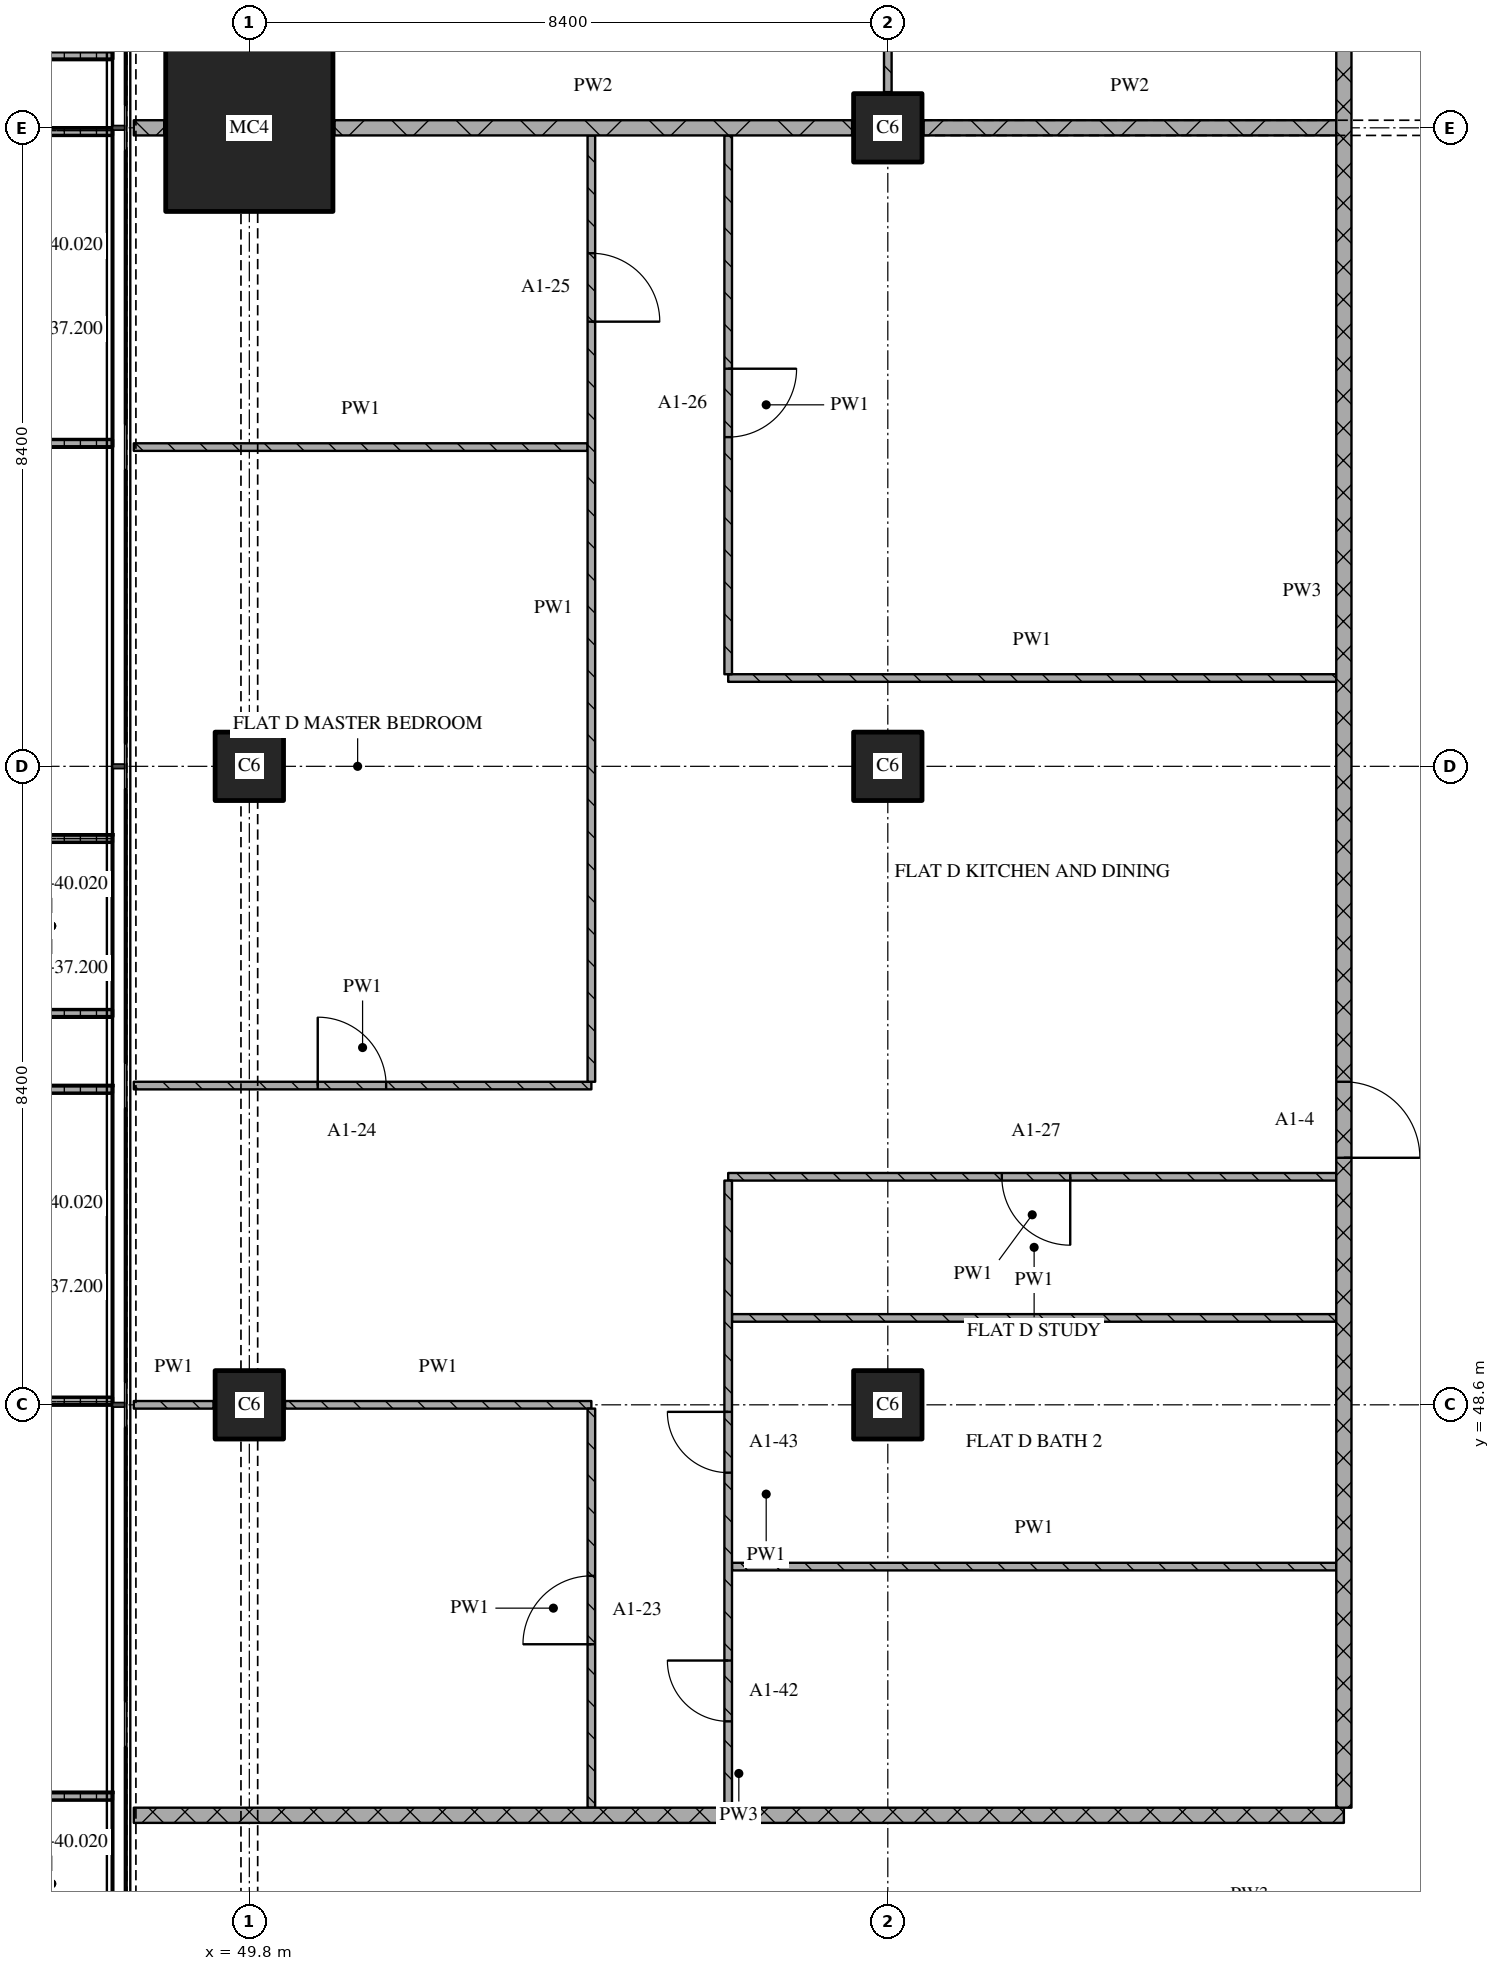
"""IFC4 building model, lengths in metres.
Left out: names, types, materials, properties, quantities, classifications, styles, units other than length and angle.
Written with IfcOpenShell. Run it as: python <this file> out.ifc"""

import sys

from ifc_helpers import new_model, si_unit, direction, frame, frame_2d, origin, origin_2d, place, context, subcontext, project, spatial, polyline, rectangle, outline, extrude, element, fill, save


model = new_model("IFC4")
c1 = context("Model", 3, precision=1e-05, world=origin(), true_north=direction((0.0, 1.0)))
c2 = subcontext(c1, "Body", "Model", "MODEL_VIEW")
j1 = project(units=[si_unit("LENGTHUNIT", "METRE"), si_unit("PLANEANGLEUNIT", "RADIAN")], contexts=[c1])
p1 = place(None, origin())
s1 = spatial("IfcSite", under=j1, at=p1, CompositionType="ELEMENT")
p2 = place(p1, origin())
s2 = spatial("IfcBuilding", under=s1, at=p2, CompositionType="ELEMENT")
p3 = place(p2, frame((0.0, 0.0, 37.2)))
s3 = spatial("IfcBuildingStorey", under=s2, at=p3, CompositionType="ELEMENT", Elevation=37.2)
for number, where, z_axis, x_axis in (
    (1, (49.8, 48.6, 0.0), (0.0, 0.0, 1.0), (1.0, 0.0, 0.0)),
    (2, (49.8, 57.0, 0.0), (0.0, 0.0, 1.0), (1.0, 0.0, 0.0)),
):
    element("IfcColumn", number, at=place(p3, frame(where, z_axis=z_axis, x_axis=x_axis)), inside=s3, PredefinedType="COLUMN", context=c2, shape_type="SweptSolid", body=[
        extrude(rectangle(XDim=0.9, YDim=0.9, at=origin_2d()), origin(), (0.0, 0.0, 1.0), 3.6),
    ])
p4 = place(p3, frame((49.8, 65.4, 0.0), z_axis=(0.0, 0.0, 1.0), x_axis=(1.0, 0.0, 0.0)))
e3 = element("IfcColumn", 3, at=p4, inside=s3, PredefinedType="COLUMN", context=c2, shape_type="SweptSolid", body=[
    extrude(rectangle(XDim=2.2, YDim=2.2, at=origin_2d()), origin(), (0.0, 0.0, 1.0), 3.6),
])
for number, where, z_axis, x_axis in (
    (4, (58.2, 48.6, 0.0), (0.0, 0.0, 1.0), (1.0, 0.0, 0.0)),
    (5, (58.2, 57.0, 0.0), (0.0, 0.0, 1.0), (1.0, 0.0, 0.0)),
    (6, (58.2, 65.4, 0.0), (0.0, 0.0, 1.0), (1.0, 0.0, 0.0)),
):
    element("IfcColumn", number, at=place(p3, frame(where, z_axis=z_axis, x_axis=x_axis)), inside=s3, PredefinedType="COLUMN", context=c2, shape_type="SweptSolid", body=[
        extrude(rectangle(XDim=0.9, YDim=0.9, at=origin_2d()), origin(), (0.0, 0.0, 1.0), 3.6),
    ])
p5 = place(p3, origin())
e7 = element("IfcWall", 7, at=p5, inside=s3, PredefinedType="SOLIDWALL", context=c2, shape_type="SweptSolid", body=[
    extrude(outline(polyline([(48.0, 68.7), (48.0, 68.6), (46.5, 68.6), (46.5, 66.4), (48.0, 66.4), (48.0, 66.3), (46.4, 66.3), (46.4, 68.7), (48.0, 68.7)])), origin(), (0.0, 0.0, 1.0), 1.0),
])
p6 = place(p3, origin())
e8 = element("IfcWall", 8, at=p6, inside=s3, PredefinedType="SOLIDWALL", context=c2, shape_type="SweptSolid", body=[
    extrude(outline(polyline([(48.0, 65.4), (48.0, 65.3), (46.367, 65.3), (46.367, 61.3), (48.0, 61.3), (48.0, 61.2), (46.267, 61.2), (46.267, 65.4), (48.0, 65.4)])), origin(), (0.0, 0.0, 1.0), 1.0),
])
p7 = place(p3, origin())
e9 = element("IfcWall", 9, at=p7, inside=s3, PredefinedType="SOLIDWALL", context=c2, shape_type="SweptSolid", body=[
    extrude(outline(polyline([(48.0, 56.1), (48.0, 56.0), (46.5, 56.0), (46.5, 53.8), (48.0, 53.8), (48.0, 53.7), (46.4, 53.7), (46.4, 56.1), (48.0, 56.1)])), origin(), (0.0, 0.0, 1.0), 1.0),
])
p8 = place(p3, origin())
e10 = element("IfcWall", 10, at=p8, inside=s3, PredefinedType="SOLIDWALL", context=c2, shape_type="SweptSolid", body=[
    extrude(outline(polyline([(48.0, 52.8), (48.0, 52.7), (46.367, 52.7), (46.367, 48.7), (48.0, 48.7), (48.0, 48.6), (46.267, 48.6), (46.267, 52.8), (48.0, 52.8)])), origin(), (0.0, 0.0, 1.0), 1.0),
])
p9 = place(p3, origin())
e11 = element("IfcWall", 11, at=p9, inside=s3, PredefinedType="SOLIDWALL", context=c2, shape_type="SweptSolid", body=[
    extrude(outline(polyline([(48.0, 43.5), (48.0, 43.4), (46.5, 43.4), (46.5, 41.2), (48.0, 41.2), (48.0, 41.1), (46.4, 41.1), (46.4, 43.5), (48.0, 43.5)])), origin(), (0.0, 0.0, 1.0), 1.0),
])
p10 = place(p3, frame((48.28, 43.2, 0.0), z_axis=(0.0, 0.0, 1.0), x_axis=(1.0, 0.0, 0.0)))
e12 = element("IfcWall", 12, at=p10, inside=s3, PredefinedType="PARTITIONING", context=c2, shape_type="SweptSolid", body=[
    extrude(rectangle(XDim=15.92, YDim=0.2, at=frame_2d((7.96, 0.0))), origin(), (0.0, 0.0, 1.0), 3.32),
])
p11 = place(p3, frame((56.15, 46.472, 0.0), z_axis=(0.0, 0.0, 1.0), x_axis=(1.0, 0.0, 0.0)))
e13 = element("IfcWall", 13, at=p11, inside=s3, PredefinedType="PARTITIONING", context=c2, shape_type="SweptSolid", body=[
    extrude(rectangle(XDim=7.95, YDim=0.1, at=frame_2d((3.975, 0.0))), origin(), (0.0, 0.0, 1.0), 3.32),
])
p12 = place(p3, frame((48.28, 48.6, 0.0), z_axis=(0.0, 0.0, 1.0), x_axis=(1.0, 0.0, 0.0)))
e14 = element("IfcWall", 14, at=p12, inside=s3, PredefinedType="PARTITIONING", context=c2, shape_type="SweptSolid", body=[
    extrude(rectangle(XDim=1.05, YDim=0.1, at=frame_2d((0.525, 0.0))), origin(), (0.0, 0.0, 1.0), 3.32),
])
p13 = place(p3, frame((50.27, 48.6, 0.0), z_axis=(0.0, 0.0, 1.0), x_axis=(1.0, 0.0, 0.0)))
e15 = element("IfcWall", 15, at=p13, inside=s3, PredefinedType="PARTITIONING", context=c2, shape_type="SweptSolid", body=[
    extrude(rectangle(XDim=4.03, YDim=0.1, at=frame_2d((2.015, 0.0))), origin(), (0.0, 0.0, 1.0), 3.32),
])
p14 = place(p3, frame((56.15, 49.743, 0.0), z_axis=(0.0, 0.0, 1.0), x_axis=(1.0, 0.0, 0.0)))
e16 = element("IfcWall", 16, at=p14, inside=s3, PredefinedType="PARTITIONING", context=c2, shape_type="SweptSolid", body=[
    extrude(rectangle(XDim=7.95, YDim=0.1, at=frame_2d((3.975, 0.0))), origin(), (0.0, 0.0, 1.0), 3.32),
])
p15 = place(p3, frame((64.1, 51.6, 0.0), z_axis=(0.0, 0.0, 1.0), x_axis=(-1.0, 0.0, 0.0)))
e17 = element("IfcWall", 17, at=p15, inside=s3, PredefinedType="PARTITIONING", context=c2, shape_type="SweptSolid", body=[
    extrude(rectangle(XDim=8.0, YDim=0.1, at=frame_2d((4.0, 0.0))), origin(), (0.0, 0.0, 1.0), 3.32),
])
p16 = place(p15, frame((3.5, 0.0, 0.0)))
e18 = element("IfcOpeningElement", 18, at=p16, cuts=e17, PredefinedType="OPENING", context=c2, shape_type="SweptSolid", body=[
    extrude(rectangle(XDim=0.9, YDim=2.1, at=frame_2d((0.45, 1.05))), frame((0.0, 0.06, 0.0), z_axis=(0.0, -1.0, 0.0), x_axis=(1.0, 0.0, 0.0)), (0.0, 0.0, 1.0), 0.12),
])
p17 = place(p3, frame((48.28, 52.8, 0.0), z_axis=(0.0, 0.0, 1.0), x_axis=(1.0, 0.0, 0.0)))
e19 = element("IfcWall", 19, at=p17, inside=s3, PredefinedType="PARTITIONING", context=c2, shape_type="SweptSolid", body=[
    extrude(rectangle(XDim=6.02, YDim=0.1, at=frame_2d((3.01, 0.0))), origin(), (0.0, 0.0, 1.0), 3.32),
])
p18 = place(p17, frame((2.42, 0.0, 0.0)))
e20 = element("IfcOpeningElement", 20, at=p18, cuts=e19, PredefinedType="OPENING", context=c2, shape_type="SweptSolid", body=[
    extrude(rectangle(XDim=0.9, YDim=2.1, at=frame_2d((0.45, 1.05))), frame((0.0, 0.06, 0.0), z_axis=(0.0, -1.0, 0.0), x_axis=(1.0, 0.0, 0.0)), (0.0, 0.0, 1.0), 0.12),
])
p19 = place(p3, frame((56.1, 58.162, 0.0), z_axis=(0.0, 0.0, 1.0), x_axis=(1.0, 0.0, 0.0)))
e21 = element("IfcWall", 21, at=p19, inside=s3, PredefinedType="PARTITIONING", context=c2, shape_type="SweptSolid", body=[
    extrude(rectangle(XDim=8.0, YDim=0.1, at=frame_2d((4.0, 0.0))), origin(), (0.0, 0.0, 1.0), 3.32),
])
p20 = place(p3, frame((48.28, 61.2, 0.0), z_axis=(0.0, 0.0, 1.0), x_axis=(1.0, 0.0, 0.0)))
e22 = element("IfcWall", 22, at=p20, inside=s3, PredefinedType="PARTITIONING", context=c2, shape_type="SweptSolid", body=[
    extrude(rectangle(XDim=5.97, YDim=0.1, at=frame_2d((2.985, 0.0))), origin(), (0.0, 0.0, 1.0), 3.32),
])
p21 = place(p3, frame((48.28, 65.4, 0.0), z_axis=(0.0, 0.0, 1.0), x_axis=(1.0, 0.0, 0.0)))
e23 = element("IfcWall", 23, at=p21, inside=s3, PredefinedType="PARTITIONING", context=c2, shape_type="SweptSolid", body=[
    extrude(rectangle(XDim=0.4, YDim=0.2, at=frame_2d((0.2, 0.0))), origin(), (0.0, 0.0, 1.0), 3.32),
])
p22 = place(p3, frame((50.92, 65.4, 0.0), z_axis=(0.0, 0.0, 1.0), x_axis=(1.0, 0.0, 0.0)))
e24 = element("IfcWall", 24, at=p22, inside=s3, PredefinedType="PARTITIONING", context=c2, shape_type="SweptSolid", body=[
    extrude(rectangle(XDim=6.81, YDim=0.2, at=frame_2d((3.405, 0.0))), origin(), (0.0, 0.0, 1.0), 3.32),
])
p23 = place(p3, frame((58.67, 65.4, 0.0), z_axis=(0.0, 0.0, 1.0), x_axis=(1.0, 0.0, 0.0)))
e25 = element("IfcWall", 25, at=p23, inside=s3, PredefinedType="PARTITIONING", context=c2, shape_type="SweptSolid", body=[
    extrude(rectangle(XDim=5.43, YDim=0.2, at=frame_2d((2.715, 0.0))), origin(), (0.0, 0.0, 1.0), 2.82),
])
p24 = place(p3, frame((54.3, 43.3, 0.0), z_axis=(0.0, 0.0, 1.0), x_axis=(0.0, 1.0, 0.0)))
e26 = element("IfcWall", 26, at=p24, inside=s3, PredefinedType="PARTITIONING", context=c2, shape_type="SweptSolid", body=[
    extrude(rectangle(XDim=5.25, YDim=0.1, at=frame_2d((2.625, 0.0))), origin(), (0.0, 0.0, 1.0), 3.32),
])
p25 = place(p24, frame((2.15, 0.0, 0.0)))
e27 = element("IfcOpeningElement", 27, at=p25, cuts=e26, PredefinedType="OPENING", context=c2, shape_type="SweptSolid", body=[
    extrude(rectangle(XDim=0.9, YDim=2.1, at=frame_2d((0.45, 1.05))), frame((0.0, 0.06, 0.0), z_axis=(0.0, -1.0, 0.0), x_axis=(1.0, 0.0, 0.0)), (0.0, 0.0, 1.0), 0.12),
])
p26 = place(p3, frame((54.3, 52.85, 0.0), z_axis=(0.0, 0.0, 1.0), x_axis=(0.0, 1.0, 0.0)))
e28 = element("IfcWall", 28, at=p26, inside=s3, PredefinedType="PARTITIONING", context=c2, shape_type="SweptSolid", body=[
    extrude(rectangle(XDim=12.45, YDim=0.1, at=frame_2d((6.225, 0.0))), origin(), (0.0, 0.0, 1.0), 3.32),
])
p27 = place(p26, frame((10.0, 0.0, 0.0)))
e29 = element("IfcOpeningElement", 29, at=p27, cuts=e28, PredefinedType="OPENING", context=c2, shape_type="SweptSolid", body=[
    extrude(rectangle(XDim=0.9, YDim=2.1, at=frame_2d((0.45, 1.05))), frame((0.0, 0.06, 0.0), z_axis=(0.0, -1.0, 0.0), x_axis=(1.0, 0.0, 0.0)), (0.0, 0.0, 1.0), 0.12),
])
p28 = place(p3, frame((56.1, 51.55, 0.0), z_axis=(0.0, 0.0, 1.0), x_axis=(0.0, -1.0, 0.0)))
e30 = element("IfcWall", 30, at=p28, inside=s3, PredefinedType="PARTITIONING", context=c2, shape_type="SweptSolid", body=[
    extrude(rectangle(XDim=8.25, YDim=0.1, at=frame_2d((4.125, 0.0))), origin(), (0.0, 0.0, 1.0), 3.32),
])
p29 = place(p28, frame((3.042, 0.0, 0.0)))
e31 = element("IfcOpeningElement", 31, at=p29, cuts=e30, PredefinedType="OPENING", context=c2, shape_type="SweptSolid", body=[
    extrude(rectangle(XDim=0.8, YDim=2.1, at=frame_2d((0.4, 1.05))), frame((0.0, 0.06, 0.0), z_axis=(0.0, -1.0, 0.0), x_axis=(1.0, 0.0, 0.0)), (0.0, 0.0, 1.0), 0.12),
])
p30 = place(p28, frame((6.314, 0.0, 0.0)))
e32 = element("IfcOpeningElement", 32, at=p30, cuts=e30, PredefinedType="OPENING", context=c2, shape_type="SweptSolid", body=[
    extrude(rectangle(XDim=0.8, YDim=2.1, at=frame_2d((0.4, 1.05))), frame((0.0, 0.06, 0.0), z_axis=(0.0, -1.0, 0.0), x_axis=(1.0, 0.0, 0.0)), (0.0, 0.0, 1.0), 0.12),
])
p31 = place(p3, frame((56.1, 65.3, 0.0), z_axis=(0.0, 0.0, 1.0), x_axis=(0.0, -1.0, 0.0)))
e33 = element("IfcWall", 33, at=p31, inside=s3, PredefinedType="PARTITIONING", context=c2, shape_type="SweptSolid", body=[
    extrude(rectangle(XDim=7.088, YDim=0.1, at=frame_2d((3.544, 0.0))), origin(), (0.0, 0.0, 1.0), 3.32),
])
p32 = place(p31, frame((3.069, 0.0, 0.0)))
e34 = element("IfcOpeningElement", 34, at=p32, cuts=e33, PredefinedType="OPENING", context=c2, shape_type="SweptSolid", body=[
    extrude(rectangle(XDim=0.9, YDim=2.1, at=frame_2d((0.45, 1.05))), frame((0.0, 0.06, 0.0), z_axis=(0.0, -1.0, 0.0), x_axis=(1.0, 0.0, 0.0)), (0.0, 0.0, 1.0), 0.12),
])
p33 = place(p3, frame((58.2, 68.95, 0.0), z_axis=(0.0, 0.0, 1.0), x_axis=(0.0, -1.0, 0.0)))
e35 = element("IfcWall", 35, at=p33, inside=s3, PredefinedType="PARTITIONING", context=c2, shape_type="SweptSolid", body=[
    extrude(rectangle(XDim=3.08, YDim=0.1, at=frame_2d((1.54, 0.0))), origin(), (0.0, 0.0, 1.0), 3.32),
])
p34 = place(p3, frame((64.2, 43.3, 0.0), z_axis=(0.0, 0.0, 1.0), x_axis=(0.0, 1.0, 0.0)))
e36 = element("IfcWall", 36, at=p34, inside=s3, PredefinedType="PARTITIONING", context=c2, shape_type="SweptSolid", body=[
    extrude(rectangle(XDim=32.02, YDim=0.2, at=frame_2d((16.01, 0.0))), origin(), (0.0, 0.0, 1.0), 3.32),
])
p35 = place(p34, frame((8.55, 0.0, 0.0)))
e37 = element("IfcOpeningElement", 37, at=p35, cuts=e36, PredefinedType="OPENING", context=c2, shape_type="SweptSolid", body=[
    extrude(rectangle(XDim=1.0, YDim=2.1, at=frame_2d((0.5, 1.05))), frame((0.0, 0.11, 0.0), z_axis=(0.0, -1.0, 0.0), x_axis=(1.0, 0.0, 0.0)), (0.0, 0.0, 1.0), 0.22),
])
p36 = place(p34, frame((25.95, 0.0, 0.0)))
e38 = element("IfcOpeningElement", 38, at=p36, cuts=e36, PredefinedType="OPENING", context=c2, shape_type="SweptSolid", body=[
    extrude(rectangle(XDim=1.0, YDim=2.1, at=frame_2d((0.5, 1.05))), frame((0.0, 0.11, 0.0), z_axis=(0.0, -1.0, 0.0), x_axis=(1.0, 0.0, 0.0)), (0.0, 0.0, 1.0), 0.22),
])
p37 = place(p16, origin())
e39 = element("IfcDoor", 39, at=p37, inside=s3, OperationType="SINGLE_SWING_LEFT", PredefinedType="DOOR", context=c2, shape_type="SweptSolid", body=[
    extrude(rectangle(XDim=0.9, YDim=2.1, at=frame_2d((0.45, 1.05))), frame((0.0, 0.025, 0.0), z_axis=(0.0, -1.0, 0.0), x_axis=(1.0, 0.0, 0.0)), (0.0, 0.0, 1.0), 0.05),
])
fill(e18, e39)
p38 = place(p18, origin())
e40 = element("IfcDoor", 40, at=p38, inside=s3, OperationType="SINGLE_SWING_LEFT", PredefinedType="DOOR", context=c2, shape_type="SweptSolid", body=[
    extrude(rectangle(XDim=0.9, YDim=2.1, at=frame_2d((0.45, 1.05))), frame((0.0, 0.025, 0.0), z_axis=(0.0, -1.0, 0.0), x_axis=(1.0, 0.0, 0.0)), (0.0, 0.0, 1.0), 0.05),
])
fill(e20, e40)
p39 = place(p25, origin())
e41 = element("IfcDoor", 41, at=p39, inside=s3, OperationType="SINGLE_SWING_LEFT", PredefinedType="DOOR", context=c2, shape_type="SweptSolid", body=[
    extrude(rectangle(XDim=0.9, YDim=2.1, at=frame_2d((0.45, 1.05))), frame((0.0, 0.025, 0.0), z_axis=(0.0, -1.0, 0.0), x_axis=(1.0, 0.0, 0.0)), (0.0, 0.0, 1.0), 0.05),
])
fill(e27, e41)
p40 = place(p27, origin())
e42 = element("IfcDoor", 42, at=p40, inside=s3, OperationType="SINGLE_SWING_RIGHT", PredefinedType="DOOR", context=c2, shape_type="SweptSolid", body=[
    extrude(rectangle(XDim=0.9, YDim=2.1, at=frame_2d((0.45, 1.05))), frame((0.0, 0.025, 0.0), z_axis=(0.0, -1.0, 0.0), x_axis=(1.0, 0.0, 0.0)), (0.0, 0.0, 1.0), 0.05),
])
fill(e29, e42)
p41 = place(p29, origin())
e43 = element("IfcDoor", 43, at=p41, inside=s3, OperationType="SINGLE_SWING_RIGHT", PredefinedType="DOOR", context=c2, shape_type="SweptSolid", body=[
    extrude(rectangle(XDim=0.8, YDim=2.1, at=frame_2d((0.4, 1.05))), frame((0.0, 0.025, 0.0), z_axis=(0.0, -1.0, 0.0), x_axis=(1.0, 0.0, 0.0)), (0.0, 0.0, 1.0), 0.05),
])
fill(e31, e43)
p42 = place(p30, origin())
e44 = element("IfcDoor", 44, at=p42, inside=s3, OperationType="SINGLE_SWING_RIGHT", PredefinedType="DOOR", context=c2, shape_type="SweptSolid", body=[
    extrude(rectangle(XDim=0.8, YDim=2.1, at=frame_2d((0.4, 1.05))), frame((0.0, 0.025, 0.0), z_axis=(0.0, -1.0, 0.0), x_axis=(1.0, 0.0, 0.0)), (0.0, 0.0, 1.0), 0.05),
])
fill(e32, e44)
p43 = place(p32, origin())
e45 = element("IfcDoor", 45, at=p43, inside=s3, OperationType="SINGLE_SWING_LEFT", PredefinedType="DOOR", context=c2, shape_type="SweptSolid", body=[
    extrude(rectangle(XDim=0.9, YDim=2.1, at=frame_2d((0.45, 1.05))), frame((0.0, 0.025, 0.0), z_axis=(0.0, -1.0, 0.0), x_axis=(1.0, 0.0, 0.0)), (0.0, 0.0, 1.0), 0.05),
])
fill(e34, e45)
p44 = place(p35, origin())
e46 = element("IfcDoor", 46, at=p44, inside=s3, OperationType="SINGLE_SWING_RIGHT", PredefinedType="DOOR", context=c2, shape_type="SweptSolid", body=[
    extrude(rectangle(XDim=1.0, YDim=2.1, at=frame_2d((0.5, 1.05))), frame((0.0, 0.025, 0.0), z_axis=(0.0, -1.0, 0.0), x_axis=(1.0, 0.0, 0.0)), (0.0, 0.0, 1.0), 0.05),
])
fill(e37, e46)
save(model, sys.argv[1])
